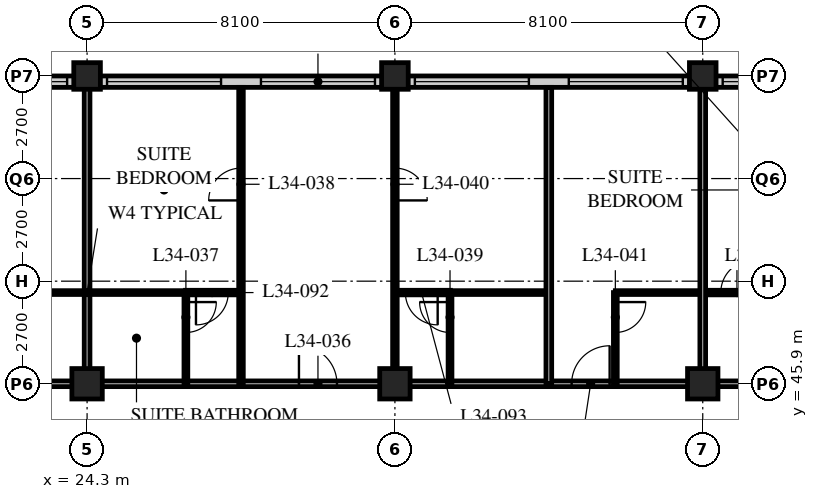
"""IFC4 building model, lengths in metres.
Left out: names, types, materials, properties, quantities, classifications, styles, units other than length and angle.
Written with IfcOpenShell. Run it as: python <this file> out.ifc"""

import sys

from ifc_helpers import new_model, si_unit, direction, frame, frame_2d, origin, origin_2d, place, context, subcontext, project, spatial, rectangle, hollow_rectangle, extrude, element, fill, save


model = new_model("IFC4")
c1 = context("Model", 3, precision=1e-05, world=origin(), true_north=direction((0.0, 1.0)))
c2 = subcontext(c1, "Body", "Model", "MODEL_VIEW")
j1 = project(units=[si_unit("LENGTHUNIT", "METRE"), si_unit("PLANEANGLEUNIT", "RADIAN")], contexts=[c1])
p1 = place(None, origin())
s1 = spatial("IfcSite", under=j1, at=p1, CompositionType="ELEMENT")
p2 = place(p1, origin())
s2 = spatial("IfcBuilding", under=s1, at=p2, CompositionType="ELEMENT")
p3 = place(p2, frame((0.0, 0.0, 134.0)))
s3 = spatial("IfcBuildingStorey", under=s2, at=p3, CompositionType="ELEMENT", Elevation=134.0)
p4 = place(p3, frame((24.3, 45.9, 0.0), z_axis=(0.0, 0.0, 1.0), x_axis=(1.0, 0.0, 0.0)))
e1 = element("IfcColumn", 1, at=p4, inside=s3, PredefinedType="COLUMN", context=c2, shape_type="SweptSolid", body=[
    extrude(hollow_rectangle(XDim=0.8, YDim=0.8, WallThickness=0.08, at=origin_2d()), origin(), (0.0, 0.0, 1.0), 3.4),
])
p5 = place(p3, frame((24.3, 54.0, 0.0), z_axis=(0.0, 0.0, 1.0), x_axis=(1.0, 0.0, 0.0)))
e2 = element("IfcColumn", 2, at=p5, inside=s3, PredefinedType="COLUMN", context=c2, shape_type="SweptSolid", body=[
    extrude(hollow_rectangle(XDim=0.7, YDim=0.7, WallThickness=0.07, at=origin_2d()), origin(), (0.0, 0.0, 1.0), 3.4),
])
p6 = place(p3, frame((32.4, 45.9, 0.0), z_axis=(0.0, 0.0, 1.0), x_axis=(1.0, 0.0, 0.0)))
e3 = element("IfcColumn", 3, at=p6, inside=s3, PredefinedType="COLUMN", context=c2, shape_type="SweptSolid", body=[
    extrude(hollow_rectangle(XDim=0.8, YDim=0.8, WallThickness=0.08, at=origin_2d()), origin(), (0.0, 0.0, 1.0), 3.4),
])
p7 = place(p3, frame((32.4, 54.0, 0.0), z_axis=(0.0, 0.0, 1.0), x_axis=(1.0, 0.0, 0.0)))
e4 = element("IfcColumn", 4, at=p7, inside=s3, PredefinedType="COLUMN", context=c2, shape_type="SweptSolid", body=[
    extrude(hollow_rectangle(XDim=0.7, YDim=0.7, WallThickness=0.07, at=origin_2d()), origin(), (0.0, 0.0, 1.0), 3.4),
])
p8 = place(p3, frame((40.5, 45.9, 0.0), z_axis=(0.0, 0.0, 1.0), x_axis=(1.0, 0.0, 0.0)))
e5 = element("IfcColumn", 5, at=p8, inside=s3, PredefinedType="COLUMN", context=c2, shape_type="SweptSolid", body=[
    extrude(hollow_rectangle(XDim=0.8, YDim=0.8, WallThickness=0.08, at=origin_2d()), origin(), (0.0, 0.0, 1.0), 3.4),
])
p9 = place(p3, frame((40.5, 54.0, 0.0), z_axis=(0.0, 0.0, 1.0), x_axis=(1.0, 0.0, 0.0)))
e6 = element("IfcColumn", 6, at=p9, inside=s3, PredefinedType="COLUMN", context=c2, shape_type="SweptSolid", body=[
    extrude(hollow_rectangle(XDim=0.7, YDim=0.7, WallThickness=0.07, at=origin_2d()), origin(), (0.0, 0.0, 1.0), 3.4),
])
p10 = place(p3, frame((48.3, 53.85, 0.0), z_axis=(0.0, 0.0, 1.0), x_axis=(-1.0, 0.0, 0.0)))
e7 = element("IfcWall", 7, at=p10, inside=s3, PredefinedType="SOLIDWALL", context=c2, shape_type="SweptSolid", body=[
    extrude(rectangle(XDim=40.2, YDim=0.3, at=frame_2d((20.1, 0.0))), origin(), (0.0, 0.0, 1.0), 3.19),
])
p11 = place(p10, frame((0.225, 0.0, 0.9)))
e8 = element("IfcOpeningElement", 8, at=p11, cuts=e7, PredefinedType="OPENING", context=c2, shape_type="SweptSolid", body=[
    extrude(rectangle(XDim=3.0, YDim=2.0, at=frame_2d((1.5, 1.0))), frame((0.0, 0.16, 0.0), z_axis=(0.0, -1.0, 0.0), x_axis=(1.0, 0.0, 0.0)), (0.0, 0.0, 1.0), 0.32),
])
p12 = place(p10, frame((4.275, 0.0, 0.9)))
e9 = element("IfcOpeningElement", 9, at=p12, cuts=e7, PredefinedType="OPENING", context=c2, shape_type="SweptSolid", body=[
    extrude(rectangle(XDim=3.0, YDim=2.0, at=frame_2d((1.5, 1.0))), frame((0.0, 0.16, 0.0), z_axis=(0.0, -1.0, 0.0), x_axis=(1.0, 0.0, 0.0)), (0.0, 0.0, 1.0), 0.32),
])
p13 = place(p10, frame((8.325, 0.0, 0.9)))
e10 = element("IfcOpeningElement", 10, at=p13, cuts=e7, PredefinedType="OPENING", context=c2, shape_type="SweptSolid", body=[
    extrude(rectangle(XDim=3.0, YDim=2.0, at=frame_2d((1.5, 1.0))), frame((0.0, 0.16, 0.0), z_axis=(0.0, -1.0, 0.0), x_axis=(1.0, 0.0, 0.0)), (0.0, 0.0, 1.0), 0.32),
])
p14 = place(p10, frame((12.375, 0.0, 0.9)))
e11 = element("IfcOpeningElement", 11, at=p14, cuts=e7, PredefinedType="OPENING", context=c2, shape_type="SweptSolid", body=[
    extrude(rectangle(XDim=3.0, YDim=2.0, at=frame_2d((1.5, 1.0))), frame((0.0, 0.16, 0.0), z_axis=(0.0, -1.0, 0.0), x_axis=(1.0, 0.0, 0.0)), (0.0, 0.0, 1.0), 0.32),
])
p15 = place(p10, frame((16.425, 0.0, 0.9)))
e12 = element("IfcOpeningElement", 12, at=p15, cuts=e7, PredefinedType="OPENING", context=c2, shape_type="SweptSolid", body=[
    extrude(rectangle(XDim=3.0, YDim=2.0, at=frame_2d((1.5, 1.0))), frame((0.0, 0.16, 0.0), z_axis=(0.0, -1.0, 0.0), x_axis=(1.0, 0.0, 0.0)), (0.0, 0.0, 1.0), 0.32),
])
p16 = place(p10, frame((20.475, 0.0, 0.9)))
e13 = element("IfcOpeningElement", 13, at=p16, cuts=e7, PredefinedType="OPENING", context=c2, shape_type="SweptSolid", body=[
    extrude(rectangle(XDim=3.0, YDim=2.0, at=frame_2d((1.5, 1.0))), frame((0.0, 0.16, 0.0), z_axis=(0.0, -1.0, 0.0), x_axis=(1.0, 0.0, 0.0)), (0.0, 0.0, 1.0), 0.32),
])
p17 = place(p10, frame((24.525, 0.0, 0.9)))
e14 = element("IfcOpeningElement", 14, at=p17, cuts=e7, PredefinedType="OPENING", context=c2, shape_type="SweptSolid", body=[
    extrude(rectangle(XDim=3.0, YDim=2.0, at=frame_2d((1.5, 1.0))), frame((0.0, 0.16, 0.0), z_axis=(0.0, -1.0, 0.0), x_axis=(1.0, 0.0, 0.0)), (0.0, 0.0, 1.0), 0.32),
])
p18 = place(p10, frame((28.575, 0.0, 0.9)))
e15 = element("IfcOpeningElement", 15, at=p18, cuts=e7, PredefinedType="OPENING", context=c2, shape_type="SweptSolid", body=[
    extrude(rectangle(XDim=3.0, YDim=2.0, at=frame_2d((1.5, 1.0))), frame((0.0, 0.16, 0.0), z_axis=(0.0, -1.0, 0.0), x_axis=(1.0, 0.0, 0.0)), (0.0, 0.0, 1.0), 0.32),
])
p19 = place(p10, frame((32.625, 0.0, 0.9)))
e16 = element("IfcOpeningElement", 16, at=p19, cuts=e7, PredefinedType="OPENING", context=c2, shape_type="SweptSolid", body=[
    extrude(rectangle(XDim=3.0, YDim=2.0, at=frame_2d((1.5, 1.0))), frame((0.0, 0.16, 0.0), z_axis=(0.0, -1.0, 0.0), x_axis=(1.0, 0.0, 0.0)), (0.0, 0.0, 1.0), 0.32),
])
p20 = place(p10, frame((36.675, 0.0, 0.9)))
e17 = element("IfcOpeningElement", 17, at=p20, cuts=e7, PredefinedType="OPENING", context=c2, shape_type="SweptSolid", body=[
    extrude(rectangle(XDim=3.0, YDim=2.0, at=frame_2d((1.5, 1.0))), frame((0.0, 0.16, 0.0), z_axis=(0.0, -1.0, 0.0), x_axis=(1.0, 0.0, 0.0)), (0.0, 0.0, 1.0), 0.32),
])
p21 = place(p3, frame((8.1, 45.9, 0.0), z_axis=(0.0, 0.0, 1.0), x_axis=(1.0, 0.0, 0.0)))
e18 = element("IfcWall", 18, at=p21, inside=s3, PredefinedType="PARTITIONING", context=c2, shape_type="SweptSolid", body=[
    extrude(rectangle(XDim=36.45, YDim=0.15, at=frame_2d((18.225, 0.0))), origin(), (0.0, 0.0, 1.0), 2.578),
])
p22 = place(p21, frame((9.625, 0.0, 0.0)))
e19 = element("IfcOpeningElement", 19, at=p22, cuts=e18, PredefinedType="OPENING", context=c2, shape_type="SweptSolid", body=[
    extrude(rectangle(XDim=1.0, YDim=2.1, at=frame_2d((0.5, 1.05))), frame((0.0, 0.085, 0.0), z_axis=(0.0, -1.0, 0.0), x_axis=(1.0, 0.0, 0.0)), (0.0, 0.0, 1.0), 0.17),
])
p23 = place(p21, frame((21.775, 0.0, 0.0)))
e20 = element("IfcOpeningElement", 20, at=p23, cuts=e18, PredefinedType="OPENING", context=c2, shape_type="SweptSolid", body=[
    extrude(rectangle(XDim=1.0, YDim=2.1, at=frame_2d((0.5, 1.05))), frame((0.0, 0.085, 0.0), z_axis=(0.0, -1.0, 0.0), x_axis=(1.0, 0.0, 0.0)), (0.0, 0.0, 1.0), 0.17),
])
p24 = place(p21, frame((28.95, 0.0, 0.0)))
e21 = element("IfcOpeningElement", 21, at=p24, cuts=e18, PredefinedType="OPENING", context=c2, shape_type="SweptSolid", body=[
    extrude(rectangle(XDim=1.0, YDim=2.1, at=frame_2d((0.5, 1.05))), frame((0.0, 0.085, 0.0), z_axis=(0.0, -1.0, 0.0), x_axis=(1.0, 0.0, 0.0)), (0.0, 0.0, 1.0), 0.17),
])
p25 = place(p21, frame((33.925, 0.0, 0.0)))
e22 = element("IfcOpeningElement", 22, at=p25, cuts=e18, PredefinedType="OPENING", context=c2, shape_type="SweptSolid", body=[
    extrude(rectangle(XDim=1.0, YDim=2.1, at=frame_2d((0.5, 1.05))), frame((0.0, 0.085, 0.0), z_axis=(0.0, -1.0, 0.0), x_axis=(1.0, 0.0, 0.0)), (0.0, 0.0, 1.0), 0.17),
])
p26 = place(p21, frame((2.625, 0.0, 0.0)))
e23 = element("IfcOpeningElement", 23, at=p26, cuts=e18, PredefinedType="OPENING", context=c2, shape_type="SweptSolid", body=[
    extrude(rectangle(XDim=1.0, YDim=2.1, at=frame_2d((0.5, 1.05))), frame((0.0, 0.085, 0.0), z_axis=(0.0, -1.0, 0.0), x_axis=(1.0, 0.0, 0.0)), (0.0, 0.0, 1.0), 0.17),
])
p27 = place(p3, frame((21.7, 48.3, 0.0), z_axis=(0.0, 0.0, 1.0), x_axis=(1.0, 0.0, 0.0)))
e24 = element("IfcWall", 24, at=p27, inside=s3, PredefinedType="PARTITIONING", context=c2, shape_type="SweptSolid", body=[
    extrude(rectangle(XDim=5.2, YDim=0.1, at=frame_2d((2.6, 0.0))), origin(), (0.0, 0.0, 1.0), 3.19),
])
p28 = place(p3, frame((24.3, 45.9, 0.0), z_axis=(0.0, 0.0, 1.0), x_axis=(0.0, 1.0, 0.0)))
e25 = element("IfcWall", 25, at=p28, inside=s3, PredefinedType="PARTITIONING", context=c2, shape_type="SweptSolid", body=[
    extrude(rectangle(XDim=7.8, YDim=0.15, at=frame_2d((3.9, 0.0))), origin(), (0.0, 0.0, 1.0), 2.578),
])
p29 = place(p3, frame((26.9, 45.9, 0.0), z_axis=(0.0, 0.0, 1.0), x_axis=(0.0, 1.0, 0.0)))
e26 = element("IfcWall", 26, at=p29, inside=s3, PredefinedType="PARTITIONING", context=c2, shape_type="SweptSolid", body=[
    extrude(rectangle(XDim=2.4, YDim=0.1, at=frame_2d((1.2, 0.0))), origin(), (0.0, 0.0, 1.0), 3.19),
])
p30 = place(p29, frame((1.35, 0.0, 0.0)))
e27 = element("IfcOpeningElement", 27, at=p30, cuts=e26, PredefinedType="OPENING", context=c2, shape_type="SweptSolid", body=[
    extrude(rectangle(XDim=0.8, YDim=2.1, at=frame_2d((0.4, 1.05))), frame((0.0, 0.06, 0.0), z_axis=(0.0, -1.0, 0.0), x_axis=(1.0, 0.0, 0.0)), (0.0, 0.0, 1.0), 0.12),
])
p31 = place(p3, frame((28.35, 45.9, 0.0), z_axis=(0.0, 0.0, 1.0), x_axis=(0.0, 1.0, 0.0)))
e28 = element("IfcWall", 28, at=p31, inside=s3, PredefinedType="PARTITIONING", context=c2, shape_type="SweptSolid", body=[
    extrude(rectangle(XDim=7.8, YDim=0.12, at=frame_2d((3.9, 0.0))), origin(), (0.0, 0.0, 1.0), 3.19),
])
p32 = place(p31, frame((4.825, 0.0, 0.0)))
e29 = element("IfcOpeningElement", 29, at=p32, cuts=e28, PredefinedType="OPENING", context=c2, shape_type="SweptSolid", body=[
    extrude(rectangle(XDim=0.85, YDim=2.1, at=frame_2d((0.425, 1.05))), frame((0.0, 0.07, 0.0), z_axis=(0.0, -1.0, 0.0), x_axis=(1.0, 0.0, 0.0)), (0.0, 0.0, 1.0), 0.14),
])
p33 = place(p3, frame((33.85, 48.3, 0.0), z_axis=(0.0, 0.0, 1.0), x_axis=(1.0, 0.0, 0.0)))
e30 = element("IfcWall", 30, at=p33, inside=s3, PredefinedType="PARTITIONING", context=c2, shape_type="SweptSolid", body=[
    extrude(rectangle(XDim=2.6, YDim=0.1, at=frame_2d((1.3, 0.0))), origin(), (0.0, 0.0, 1.0), 3.19),
])
p34 = place(p3, frame((33.85, 45.9, 0.0), z_axis=(0.0, 0.0, 1.0), x_axis=(0.0, 1.0, 0.0)))
e31 = element("IfcWall", 31, at=p34, inside=s3, PredefinedType="PARTITIONING", context=c2, shape_type="SweptSolid", body=[
    extrude(rectangle(XDim=2.4, YDim=0.1, at=frame_2d((1.2, 0.0))), origin(), (0.0, 0.0, 1.0), 3.19),
])
p35 = place(p34, frame((1.35, 0.0, 0.0)))
e32 = element("IfcOpeningElement", 32, at=p35, cuts=e31, PredefinedType="OPENING", context=c2, shape_type="SweptSolid", body=[
    extrude(rectangle(XDim=0.8, YDim=2.1, at=frame_2d((0.4, 1.05))), frame((0.0, 0.06, 0.0), z_axis=(0.0, -1.0, 0.0), x_axis=(1.0, 0.0, 0.0)), (0.0, 0.0, 1.0), 0.12),
])
p36 = place(p3, frame((32.4, 45.9, 0.0), z_axis=(0.0, 0.0, 1.0), x_axis=(0.0, 1.0, 0.0)))
e33 = element("IfcWall", 33, at=p36, inside=s3, PredefinedType="PARTITIONING", context=c2, shape_type="SweptSolid", body=[
    extrude(rectangle(XDim=7.8, YDim=0.12, at=frame_2d((3.9, 0.0))), origin(), (0.0, 0.0, 1.0), 2.578),
])
p37 = place(p36, frame((4.825, 0.0, 0.0)))
e34 = element("IfcOpeningElement", 34, at=p37, cuts=e33, PredefinedType="OPENING", context=c2, shape_type="SweptSolid", body=[
    extrude(rectangle(XDim=0.85, YDim=2.1, at=frame_2d((0.425, 1.05))), frame((0.0, 0.07, 0.0), z_axis=(0.0, -1.0, 0.0), x_axis=(1.0, 0.0, 0.0)), (0.0, 0.0, 1.0), 0.14),
])
p38 = place(p3, frame((36.45, 45.9, 0.0), z_axis=(0.0, 0.0, 1.0), x_axis=(0.0, 1.0, 0.0)))
e35 = element("IfcWall", 35, at=p38, inside=s3, PredefinedType="PARTITIONING", context=c2, shape_type="SweptSolid", body=[
    extrude(rectangle(XDim=7.8, YDim=0.15, at=frame_2d((3.9, 0.0))), origin(), (0.0, 0.0, 1.0), 3.19),
])
p39 = place(p3, frame((38.2, 48.3, 0.0), z_axis=(0.0, 0.0, 1.0), x_axis=(1.0, 0.0, 0.0)))
e36 = element("IfcWall", 36, at=p39, inside=s3, PredefinedType="PARTITIONING", context=c2, shape_type="SweptSolid", body=[
    extrude(rectangle(XDim=2.3, YDim=0.1, at=frame_2d((1.15, 0.0))), origin(), (0.0, 0.0, 1.0), 3.19),
])
p40 = place(p3, frame((38.2, 45.9, 0.0), z_axis=(0.0, 0.0, 1.0), x_axis=(0.0, 1.0, 0.0)))
e37 = element("IfcWall", 37, at=p40, inside=s3, PredefinedType="PARTITIONING", context=c2, shape_type="SweptSolid", body=[
    extrude(rectangle(XDim=2.4, YDim=0.1, at=frame_2d((1.2, 0.0))), origin(), (0.0, 0.0, 1.0), 3.19),
])
p41 = place(p40, frame((1.35, 0.0, 0.0)))
e38 = element("IfcOpeningElement", 38, at=p41, cuts=e37, PredefinedType="OPENING", context=c2, shape_type="SweptSolid", body=[
    extrude(rectangle(XDim=0.8, YDim=2.1, at=frame_2d((0.4, 1.05))), frame((0.0, 0.06, 0.0), z_axis=(0.0, -1.0, 0.0), x_axis=(1.0, 0.0, 0.0)), (0.0, 0.0, 1.0), 0.12),
])
p42 = place(p3, frame((40.5, 48.3, 0.0), z_axis=(0.0, 0.0, 1.0), x_axis=(1.0, 0.0, 0.0)))
e39 = element("IfcWall", 39, at=p42, inside=s3, PredefinedType="PARTITIONING", context=c2, shape_type="SweptSolid", body=[
    extrude(rectangle(XDim=8.05, YDim=0.12, at=frame_2d((4.025, 0.0))), origin(), (0.0, 0.0, 1.0), 3.19),
])
p43 = place(p42, frame((0.475, 0.0, 0.0)))
e40 = element("IfcOpeningElement", 40, at=p43, cuts=e39, PredefinedType="OPENING", context=c2, shape_type="SweptSolid", body=[
    extrude(rectangle(XDim=0.85, YDim=2.1, at=frame_2d((0.425, 1.05))), frame((0.0, 0.07, 0.0), z_axis=(0.0, -1.0, 0.0), x_axis=(1.0, 0.0, 0.0)), (0.0, 0.0, 1.0), 0.14),
])
p44 = place(p42, frame((4.325, 0.0, 0.0)))
e41 = element("IfcOpeningElement", 41, at=p44, cuts=e39, PredefinedType="OPENING", context=c2, shape_type="SweptSolid", body=[
    extrude(rectangle(XDim=0.85, YDim=2.1, at=frame_2d((0.425, 1.05))), frame((0.0, 0.07, 0.0), z_axis=(0.0, -1.0, 0.0), x_axis=(1.0, 0.0, 0.0)), (0.0, 0.0, 1.0), 0.14),
])
p45 = place(p3, frame((40.5, 45.9, 0.0), z_axis=(0.0, 0.0, 1.0), x_axis=(0.0, 1.0, 0.0)))
e42 = element("IfcWall", 42, at=p45, inside=s3, PredefinedType="PARTITIONING", context=c2, shape_type="SweptSolid", body=[
    extrude(rectangle(XDim=7.8, YDim=0.15, at=frame_2d((3.9, 0.0))), origin(), (0.0, 0.0, 1.0), 2.578),
])
p46 = place(p3, frame((26.89, 48.3, 0.0), z_axis=(0.0, 0.0, 1.0), x_axis=(1.0, 0.0, 0.0)))
e43 = element("IfcWall", 43, at=p46, inside=s3, PredefinedType="PARTITIONING", context=c2, shape_type="SweptSolid", body=[
    extrude(rectangle(XDim=1.46, YDim=0.12, at=frame_2d((0.73, 0.0))), origin(), (0.0, 0.0, 1.0), 3.19),
])
p47 = place(p46, frame((0.275, 0.0, 0.0)))
e44 = element("IfcOpeningElement", 44, at=p47, cuts=e43, PredefinedType="OPENING", context=c2, shape_type="SweptSolid", body=[
    extrude(rectangle(XDim=0.85, YDim=2.1, at=frame_2d((0.425, 1.05))), frame((0.0, 0.07, 0.0), z_axis=(0.0, -1.0, 0.0), x_axis=(1.0, 0.0, 0.0)), (0.0, 0.0, 1.0), 0.14),
])
p48 = place(p3, frame((32.4, 48.3, 0.0), z_axis=(0.0, 0.0, 1.0), x_axis=(1.0, 0.0, 0.0)))
e45 = element("IfcWall", 45, at=p48, inside=s3, PredefinedType="PARTITIONING", context=c2, shape_type="SweptSolid", body=[
    extrude(rectangle(XDim=1.46, YDim=0.12, at=frame_2d((0.73, 0.0))), origin(), (0.0, 0.0, 1.0), 3.19),
])
p49 = place(p48, frame((0.275, 0.0, 0.0)))
e46 = element("IfcOpeningElement", 46, at=p49, cuts=e45, PredefinedType="OPENING", context=c2, shape_type="SweptSolid", body=[
    extrude(rectangle(XDim=0.85, YDim=2.1, at=frame_2d((0.425, 1.05))), frame((0.0, 0.07, 0.0), z_axis=(0.0, -1.0, 0.0), x_axis=(1.0, 0.0, 0.0)), (0.0, 0.0, 1.0), 0.14),
])
p50 = place(p12, origin())
e47 = element("IfcWindow", 47, at=p50, inside=s3, PartitioningType="SINGLE_PANEL", PredefinedType="WINDOW", context=c2, shape_type="SweptSolid", body=[
    extrude(rectangle(XDim=3.0, YDim=2.0, at=frame_2d((1.5, 1.0))), frame((0.0, 0.03, 0.0), z_axis=(0.0, -1.0, 0.0), x_axis=(1.0, 0.0, 0.0)), (0.0, 0.0, 1.0), 0.06),
])
fill(e9, e47)
p51 = place(p13, origin())
e48 = element("IfcWindow", 48, at=p51, inside=s3, PartitioningType="SINGLE_PANEL", PredefinedType="WINDOW", context=c2, shape_type="SweptSolid", body=[
    extrude(rectangle(XDim=3.0, YDim=2.0, at=frame_2d((1.5, 1.0))), frame((0.0, 0.03, 0.0), z_axis=(0.0, -1.0, 0.0), x_axis=(1.0, 0.0, 0.0)), (0.0, 0.0, 1.0), 0.06),
])
fill(e10, e48)
p52 = place(p14, origin())
e49 = element("IfcWindow", 49, at=p52, inside=s3, PartitioningType="SINGLE_PANEL", PredefinedType="WINDOW", context=c2, shape_type="SweptSolid", body=[
    extrude(rectangle(XDim=3.0, YDim=2.0, at=frame_2d((1.5, 1.0))), frame((0.0, 0.03, 0.0), z_axis=(0.0, -1.0, 0.0), x_axis=(1.0, 0.0, 0.0)), (0.0, 0.0, 1.0), 0.06),
])
fill(e11, e49)
p53 = place(p15, origin())
e50 = element("IfcWindow", 50, at=p53, inside=s3, PartitioningType="SINGLE_PANEL", PredefinedType="WINDOW", context=c2, shape_type="SweptSolid", body=[
    extrude(rectangle(XDim=3.0, YDim=2.0, at=frame_2d((1.5, 1.0))), frame((0.0, 0.03, 0.0), z_axis=(0.0, -1.0, 0.0), x_axis=(1.0, 0.0, 0.0)), (0.0, 0.0, 1.0), 0.06),
])
fill(e12, e50)
p54 = place(p16, origin())
e51 = element("IfcWindow", 51, at=p54, inside=s3, PartitioningType="SINGLE_PANEL", PredefinedType="WINDOW", context=c2, shape_type="SweptSolid", body=[
    extrude(rectangle(XDim=3.0, YDim=2.0, at=frame_2d((1.5, 1.0))), frame((0.0, 0.03, 0.0), z_axis=(0.0, -1.0, 0.0), x_axis=(1.0, 0.0, 0.0)), (0.0, 0.0, 1.0), 0.06),
])
fill(e13, e51)
p55 = place(p17, origin())
e52 = element("IfcWindow", 52, at=p55, inside=s3, PartitioningType="SINGLE_PANEL", PredefinedType="WINDOW", context=c2, shape_type="SweptSolid", body=[
    extrude(rectangle(XDim=3.0, YDim=2.0, at=frame_2d((1.5, 1.0))), frame((0.0, 0.03, 0.0), z_axis=(0.0, -1.0, 0.0), x_axis=(1.0, 0.0, 0.0)), (0.0, 0.0, 1.0), 0.06),
])
fill(e14, e52)
p56 = place(p23, origin())
e53 = element("IfcDoor", 53, at=p56, inside=s3, OperationType="SINGLE_SWING_LEFT", PredefinedType="DOOR", context=c2, shape_type="SweptSolid", body=[
    extrude(rectangle(XDim=1.0, YDim=2.1, at=frame_2d((0.5, 1.05))), frame((0.0, 0.025, 0.0), z_axis=(0.0, -1.0, 0.0), x_axis=(1.0, 0.0, 0.0)), (0.0, 0.0, 1.0), 0.05),
])
fill(e20, e53)
p57 = place(p30, origin())
e54 = element("IfcDoor", 54, at=p57, inside=s3, OperationType="SINGLE_SWING_LEFT", PredefinedType="DOOR", context=c2, shape_type="SweptSolid", body=[
    extrude(rectangle(XDim=0.8, YDim=2.1, at=frame_2d((0.4, 1.05))), frame((0.0, 0.025, 0.0), z_axis=(0.0, -1.0, 0.0), x_axis=(1.0, 0.0, 0.0)), (0.0, 0.0, 1.0), 0.05),
])
fill(e27, e54)
p58 = place(p32, origin())
e55 = element("IfcDoor", 55, at=p58, inside=s3, OperationType="SINGLE_SWING_LEFT", PredefinedType="DOOR", context=c2, shape_type="SweptSolid", body=[
    extrude(rectangle(XDim=0.85, YDim=2.1, at=frame_2d((0.425, 1.05))), frame((0.0, 0.025, 0.0), z_axis=(0.0, -1.0, 0.0), x_axis=(1.0, 0.0, 0.0)), (0.0, 0.0, 1.0), 0.05),
])
fill(e29, e55)
p59 = place(p35, origin())
e56 = element("IfcDoor", 56, at=p59, inside=s3, OperationType="SINGLE_SWING_RIGHT", PredefinedType="DOOR", context=c2, shape_type="SweptSolid", body=[
    extrude(rectangle(XDim=0.8, YDim=2.1, at=frame_2d((0.4, 1.05))), frame((0.0, 0.025, 0.0), z_axis=(0.0, -1.0, 0.0), x_axis=(1.0, 0.0, 0.0)), (0.0, 0.0, 1.0), 0.05),
])
fill(e32, e56)
p60 = place(p37, origin())
e57 = element("IfcDoor", 57, at=p60, inside=s3, OperationType="SINGLE_SWING_RIGHT", PredefinedType="DOOR", context=c2, shape_type="SweptSolid", body=[
    extrude(rectangle(XDim=0.85, YDim=2.1, at=frame_2d((0.425, 1.05))), frame((0.0, 0.025, 0.0), z_axis=(0.0, -1.0, 0.0), x_axis=(1.0, 0.0, 0.0)), (0.0, 0.0, 1.0), 0.05),
])
fill(e34, e57)
p61 = place(p41, origin())
e58 = element("IfcDoor", 58, at=p61, inside=s3, OperationType="SINGLE_SWING_LEFT", PredefinedType="DOOR", context=c2, shape_type="SweptSolid", body=[
    extrude(rectangle(XDim=0.8, YDim=2.1, at=frame_2d((0.4, 1.05))), frame((0.0, 0.025, 0.0), z_axis=(0.0, -1.0, 0.0), x_axis=(1.0, 0.0, 0.0)), (0.0, 0.0, 1.0), 0.05),
])
fill(e38, e58)
p62 = place(p24, origin())
e59 = element("IfcDoor", 59, at=p62, inside=s3, OperationType="SINGLE_SWING_RIGHT", PredefinedType="DOOR", context=c2, shape_type="SweptSolid", body=[
    extrude(rectangle(XDim=1.0, YDim=2.1, at=frame_2d((0.5, 1.05))), frame((0.0, 0.025, 0.0), z_axis=(0.0, -1.0, 0.0), x_axis=(1.0, 0.0, 0.0)), (0.0, 0.0, 1.0), 0.05),
])
fill(e21, e59)
p63 = place(p43, origin())
e60 = element("IfcDoor", 60, at=p63, inside=s3, OperationType="SINGLE_SWING_RIGHT", PredefinedType="DOOR", context=c2, shape_type="SweptSolid", body=[
    extrude(rectangle(XDim=0.85, YDim=2.1, at=frame_2d((0.425, 1.05))), frame((0.0, 0.025, 0.0), z_axis=(0.0, -1.0, 0.0), x_axis=(1.0, 0.0, 0.0)), (0.0, 0.0, 1.0), 0.05),
])
fill(e40, e60)
p64 = place(p47, origin())
e61 = element("IfcDoor", 61, at=p64, inside=s3, OperationType="SINGLE_SWING_RIGHT", PredefinedType="DOOR", context=c2, shape_type="SweptSolid", body=[
    extrude(rectangle(XDim=0.85, YDim=2.1, at=frame_2d((0.425, 1.05))), frame((0.0, 0.025, 0.0), z_axis=(0.0, -1.0, 0.0), x_axis=(1.0, 0.0, 0.0)), (0.0, 0.0, 1.0), 0.05),
])
fill(e44, e61)
p65 = place(p49, origin())
e62 = element("IfcDoor", 62, at=p65, inside=s3, OperationType="SINGLE_SWING_LEFT", PredefinedType="DOOR", context=c2, shape_type="SweptSolid", body=[
    extrude(rectangle(XDim=0.85, YDim=2.1, at=frame_2d((0.425, 1.05))), frame((0.0, 0.025, 0.0), z_axis=(0.0, -1.0, 0.0), x_axis=(1.0, 0.0, 0.0)), (0.0, 0.0, 1.0), 0.05),
])
fill(e46, e62)
save(model, sys.argv[1])
